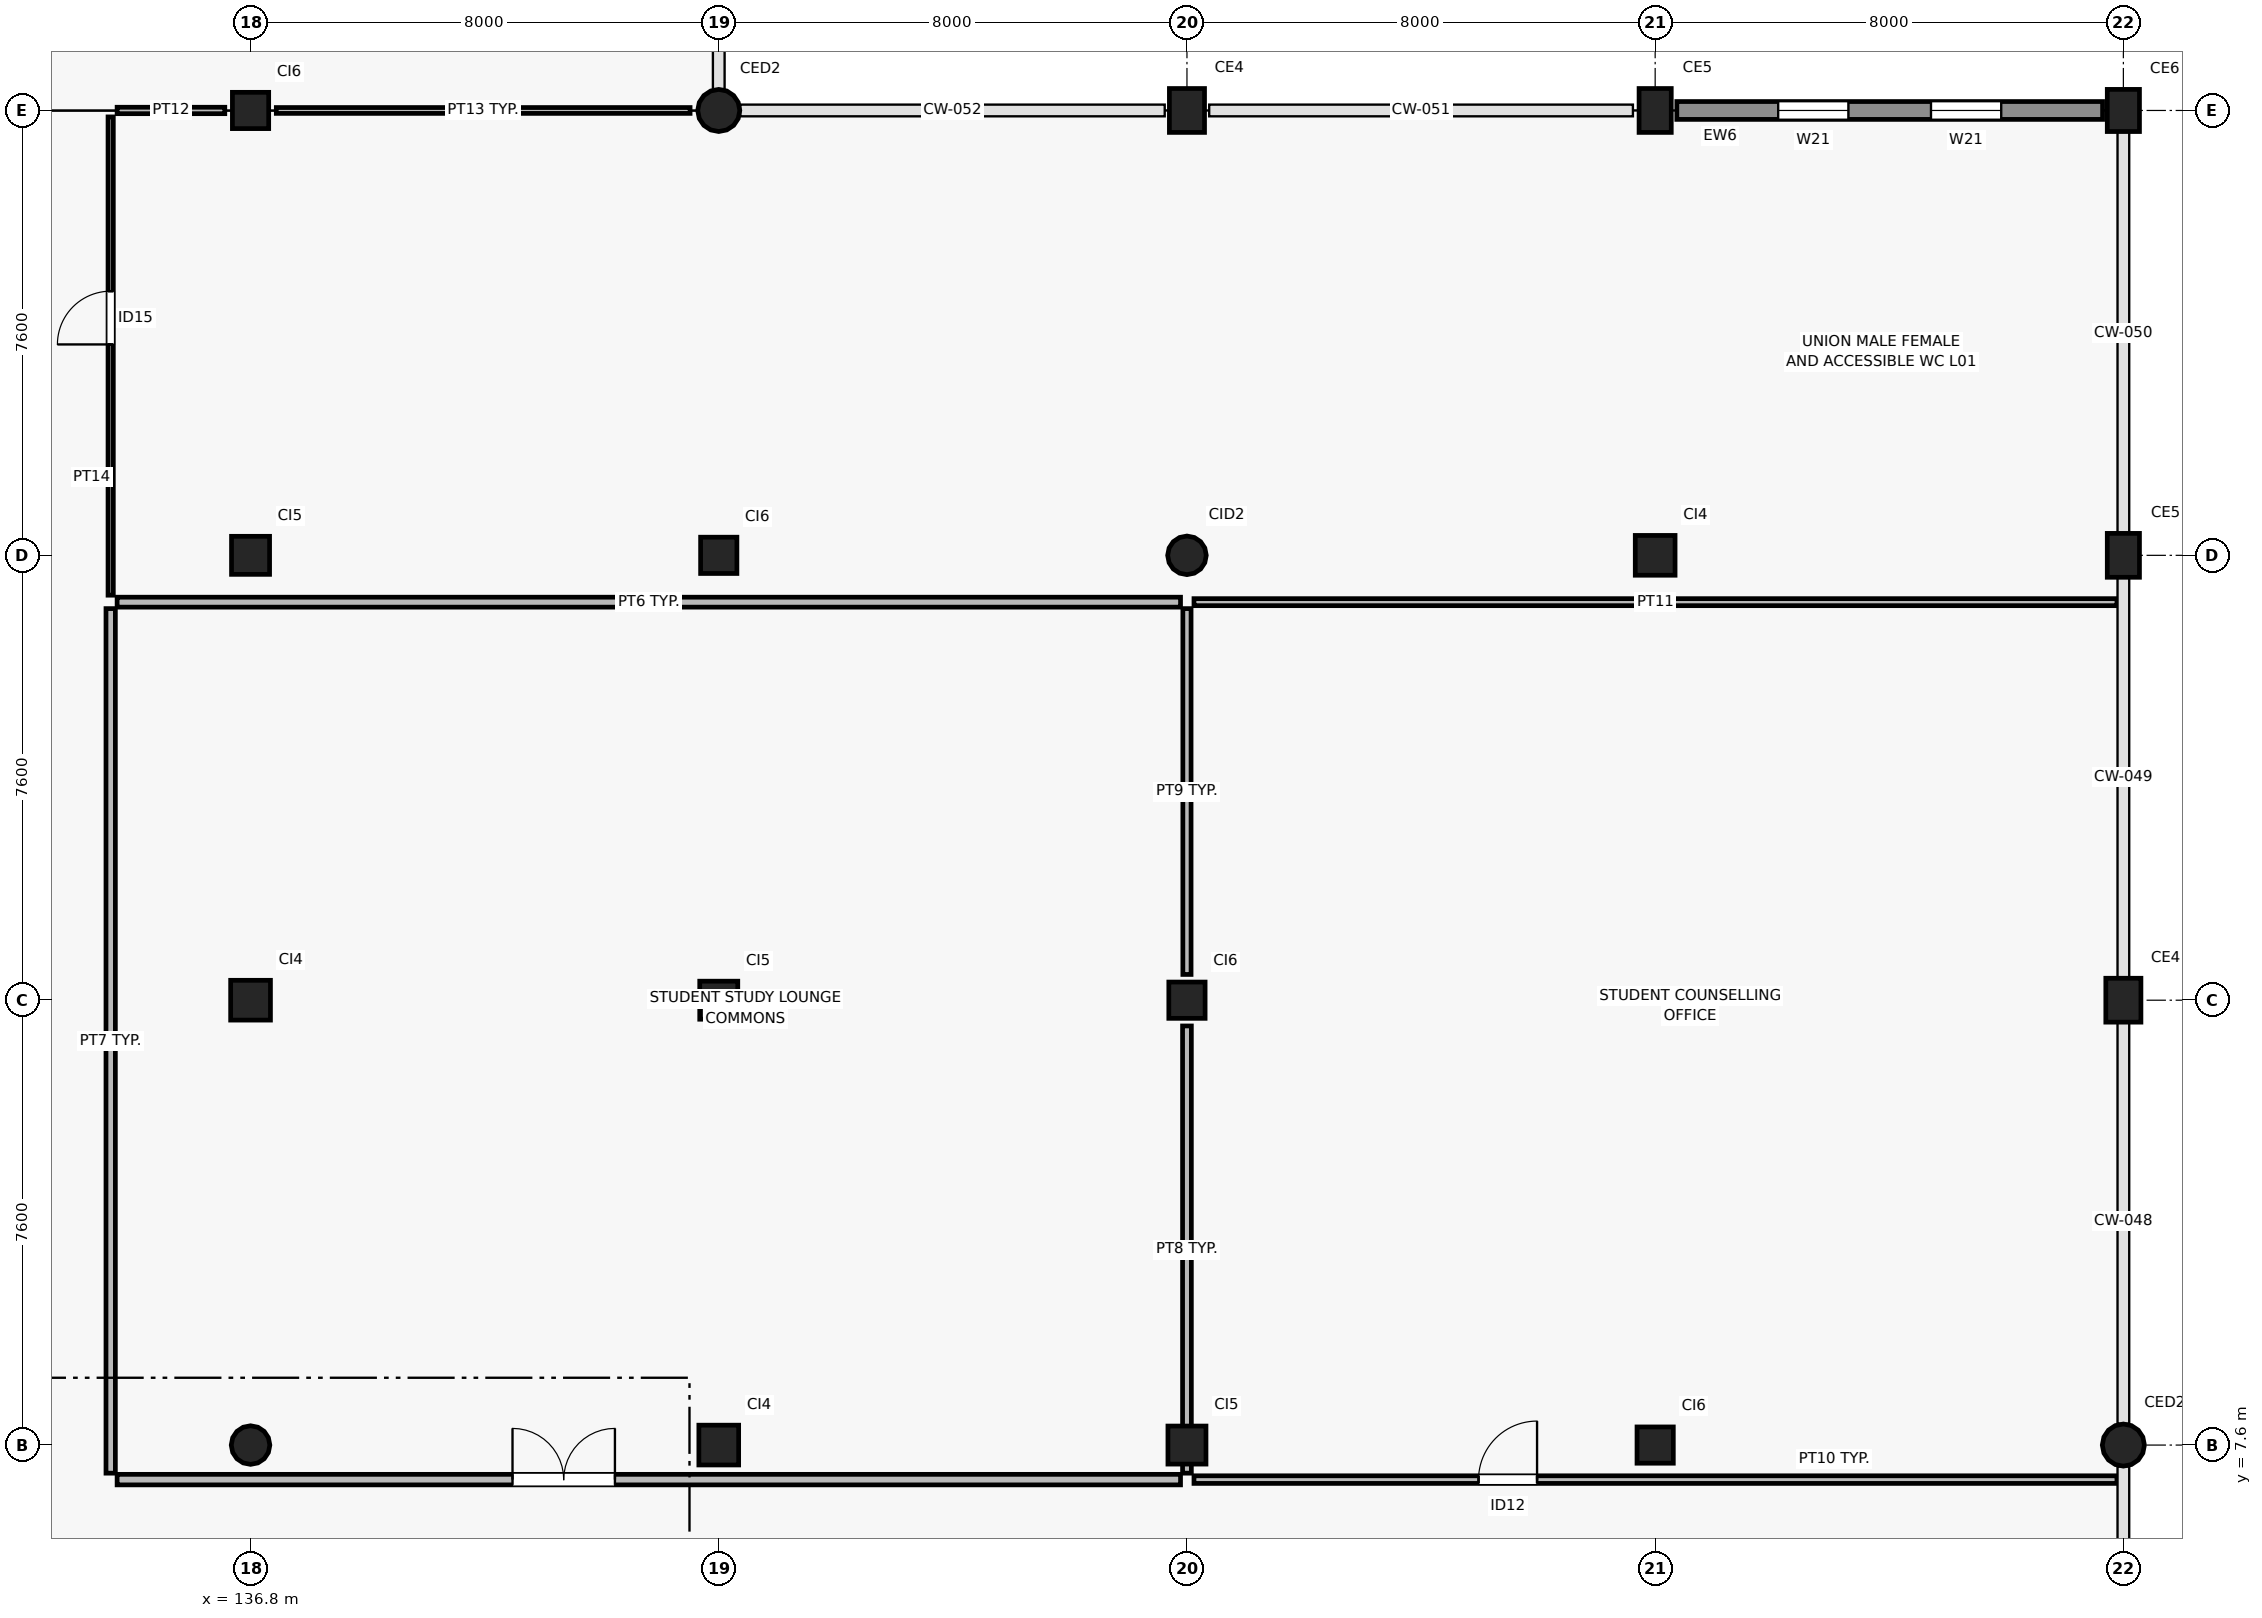
"""IFC4 building model, lengths in metres.
Left out: names, types, materials, properties, quantities, classifications, styles, units other than length and angle.
Written with IfcOpenShell. Run it as: python <this file> out.ifc"""

import sys

from ifc_helpers import new_model, si_unit, direction, frame, frame_2d, origin, origin_2d, place, context, subcontext, project, spatial, rectangle, circle, extrude, element, fill, save


model = new_model("IFC4")
c1 = context("Model", 3, precision=1e-05, world=origin(), true_north=direction((0.0, 1.0)))
c2 = subcontext(c1, "Body", "Model", "MODEL_VIEW")
j1 = project(units=[si_unit("LENGTHUNIT", "METRE"), si_unit("PLANEANGLEUNIT", "RADIAN")], contexts=[c1])
p1 = place(None, origin())
s1 = spatial("IfcSite", under=j1, at=p1, CompositionType="ELEMENT")
p2 = place(p1, origin())
s2 = spatial("IfcBuilding", under=s1, at=p2, CompositionType="ELEMENT")
p3 = place(p2, frame((0.0, 0.0, 4.5)))
s3 = spatial("IfcBuildingStorey", under=s2, at=p3, CompositionType="ELEMENT", Elevation=4.5)
p4 = place(p3, frame((136.8, 7.6, 0.0), z_axis=(0.0, 0.0, 1.0), x_axis=(1.0, 0.0, 0.0)))
e1 = element("IfcColumn", 1, at=p4, inside=s3, PredefinedType="COLUMN", context=c2, shape_type="SweptSolid", body=[
    extrude(circle(Radius=0.33, at=origin_2d()), origin(), (0.0, 0.0, 1.0), 4.5),
])
p5 = place(p3, frame((136.8, 15.2, 0.0), z_axis=(0.0, 0.0, 1.0), x_axis=(1.0, 0.0, 0.0)))
e2 = element("IfcColumn", 2, at=p5, inside=s3, PredefinedType="COLUMN", context=c2, shape_type="SweptSolid", body=[
    extrude(rectangle(XDim=0.68, YDim=0.68, at=origin_2d()), origin(), (0.0, 0.0, 1.0), 4.5),
])
p6 = place(p3, frame((136.8, 22.8, 0.0), z_axis=(0.0, 0.0, 1.0), x_axis=(1.0, 0.0, 0.0)))
e3 = element("IfcColumn", 3, at=p6, inside=s3, PredefinedType="COLUMN", context=c2, shape_type="SweptSolid", body=[
    extrude(rectangle(XDim=0.65, YDim=0.65, at=origin_2d()), origin(), (0.0, 0.0, 1.0), 4.5),
])
p7 = place(p3, frame((136.8, 30.4, 0.0), z_axis=(0.0, 0.0, 1.0), x_axis=(1.0, 0.0, 0.0)))
e4 = element("IfcColumn", 4, at=p7, inside=s3, PredefinedType="COLUMN", context=c2, shape_type="SweptSolid", body=[
    extrude(rectangle(XDim=0.62, YDim=0.62, at=origin_2d()), origin(), (0.0, 0.0, 1.0), 4.5),
])
p8 = place(p3, frame((144.8, 7.6, 0.0), z_axis=(0.0, 0.0, 1.0), x_axis=(1.0, 0.0, 0.0)))
e5 = element("IfcColumn", 5, at=p8, inside=s3, PredefinedType="COLUMN", context=c2, shape_type="SweptSolid", body=[
    extrude(rectangle(XDim=0.68, YDim=0.68, at=origin_2d()), origin(), (0.0, 0.0, 1.0), 4.5),
])
p9 = place(p3, frame((144.8, 15.2, 0.0), z_axis=(0.0, 0.0, 1.0), x_axis=(1.0, 0.0, 0.0)))
e6 = element("IfcColumn", 6, at=p9, inside=s3, PredefinedType="COLUMN", context=c2, shape_type="SweptSolid", body=[
    extrude(rectangle(XDim=0.65, YDim=0.65, at=origin_2d()), origin(), (0.0, 0.0, 1.0), 4.5),
])
p10 = place(p3, frame((144.8, 22.8, 0.0), z_axis=(0.0, 0.0, 1.0), x_axis=(1.0, 0.0, 0.0)))
e7 = element("IfcColumn", 7, at=p10, inside=s3, PredefinedType="COLUMN", context=c2, shape_type="SweptSolid", body=[
    extrude(rectangle(XDim=0.62, YDim=0.62, at=origin_2d()), origin(), (0.0, 0.0, 1.0), 4.5),
])
p11 = place(p3, frame((144.8, 30.4, 0.0), z_axis=(0.0, 0.0, 1.0), x_axis=(1.0, 0.0, 0.0)))
e8 = element("IfcColumn", 8, at=p11, inside=s3, PredefinedType="COLUMN", context=c2, shape_type="SweptSolid", body=[
    extrude(circle(Radius=0.36, at=origin_2d()), origin(), (0.0, 0.0, 1.0), 4.5),
])
p12 = place(p3, frame((152.8, 7.6, 0.0), z_axis=(0.0, 0.0, 1.0), x_axis=(1.0, 0.0, 0.0)))
e9 = element("IfcColumn", 9, at=p12, inside=s3, PredefinedType="COLUMN", context=c2, shape_type="SweptSolid", body=[
    extrude(rectangle(XDim=0.65, YDim=0.65, at=origin_2d()), origin(), (0.0, 0.0, 1.0), 4.5),
])
p13 = place(p3, frame((152.8, 15.2, 0.0), z_axis=(0.0, 0.0, 1.0), x_axis=(1.0, 0.0, 0.0)))
e10 = element("IfcColumn", 10, at=p13, inside=s3, PredefinedType="COLUMN", context=c2, shape_type="SweptSolid", body=[
    extrude(rectangle(XDim=0.62, YDim=0.62, at=origin_2d()), origin(), (0.0, 0.0, 1.0), 4.5),
])
p14 = place(p3, frame((152.8, 22.8, 0.0), z_axis=(0.0, 0.0, 1.0), x_axis=(1.0, 0.0, 0.0)))
e11 = element("IfcColumn", 11, at=p14, inside=s3, PredefinedType="COLUMN", context=c2, shape_type="SweptSolid", body=[
    extrude(circle(Radius=0.33, at=origin_2d()), origin(), (0.0, 0.0, 1.0), 4.5),
])
p15 = place(p3, frame((152.8, 30.4, 0.0), z_axis=(0.0, 0.0, 1.0), x_axis=(1.0, 0.0, 0.0)))
e12 = element("IfcColumn", 12, at=p15, inside=s3, PredefinedType="COLUMN", context=c2, shape_type="SweptSolid", body=[
    extrude(rectangle(XDim=0.75, YDim=0.6, at=origin_2d()), origin(), (0.0, 0.0, 1.0), 4.5),
])
p16 = place(p3, frame((160.8, 7.6, 0.0), z_axis=(0.0, 0.0, 1.0), x_axis=(1.0, 0.0, 0.0)))
e13 = element("IfcColumn", 13, at=p16, inside=s3, PredefinedType="COLUMN", context=c2, shape_type="SweptSolid", body=[
    extrude(rectangle(XDim=0.62, YDim=0.62, at=origin_2d()), origin(), (0.0, 0.0, 1.0), 4.5),
])
p17 = place(p3, frame((160.8, 22.8, 0.0), z_axis=(0.0, 0.0, 1.0), x_axis=(1.0, 0.0, 0.0)))
e14 = element("IfcColumn", 14, at=p17, inside=s3, PredefinedType="COLUMN", context=c2, shape_type="SweptSolid", body=[
    extrude(rectangle(XDim=0.68, YDim=0.68, at=origin_2d()), origin(), (0.0, 0.0, 1.0), 4.5),
])
p18 = place(p3, frame((160.8, 30.4, 0.0), z_axis=(0.0, 0.0, 1.0), x_axis=(1.0, 0.0, 0.0)))
e15 = element("IfcColumn", 15, at=p18, inside=s3, PredefinedType="COLUMN", context=c2, shape_type="SweptSolid", body=[
    extrude(rectangle(XDim=0.75, YDim=0.55, at=origin_2d()), origin(), (0.0, 0.0, 1.0), 4.5),
])
p19 = place(p3, frame((168.8, 7.6, 0.0), z_axis=(0.0, 0.0, 1.0), x_axis=(1.0, 0.0, 0.0)))
e16 = element("IfcColumn", 16, at=p19, inside=s3, PredefinedType="COLUMN", context=c2, shape_type="SweptSolid", body=[
    extrude(circle(Radius=0.36, at=origin_2d()), origin(), (0.0, 0.0, 1.0), 4.5),
])
p20 = place(p3, frame((168.8, 15.2, 0.0), z_axis=(0.0, 0.0, 1.0), x_axis=(1.0, 0.0, 0.0)))
e17 = element("IfcColumn", 17, at=p20, inside=s3, PredefinedType="COLUMN", context=c2, shape_type="SweptSolid", body=[
    extrude(rectangle(XDim=0.75, YDim=0.6, at=origin_2d()), origin(), (0.0, 0.0, 1.0), 4.5),
])
p21 = place(p3, frame((168.8, 22.8, 0.0), z_axis=(0.0, 0.0, 1.0), x_axis=(1.0, 0.0, 0.0)))
e18 = element("IfcColumn", 18, at=p21, inside=s3, PredefinedType="COLUMN", context=c2, shape_type="SweptSolid", body=[
    extrude(rectangle(XDim=0.75, YDim=0.55, at=origin_2d()), origin(), (0.0, 0.0, 1.0), 4.5),
])
p22 = place(p3, frame((168.8, 30.4, 0.0), z_axis=(0.0, 0.0, 1.0), x_axis=(1.0, 0.0, 0.0)))
e19 = element("IfcColumn", 19, at=p22, inside=s3, PredefinedType="COLUMN", context=c2, shape_type="SweptSolid", body=[
    extrude(rectangle(XDim=0.72, YDim=0.55, at=origin_2d()), origin(), (0.0, 0.0, 1.0), 4.5),
])
p23 = place(p3, frame((168.445, 30.4, 0.0), z_axis=(0.0, 0.0, 1.0), x_axis=(-1.0, 0.0, 0.0)))
e20 = element("IfcWall", 20, at=p23, inside=s3, PredefinedType="SOLIDWALL", context=c2, shape_type="SweptSolid", body=[
    extrude(rectangle(XDim=7.275, YDim=0.305, at=frame_2d((3.638, 0.0))), origin(), (0.0, 0.0, 1.0), 3.67),
])
p24 = place(p23, frame((1.732, 0.0, 0.9)))
e21 = element("IfcOpeningElement", 21, at=p24, cuts=e20, PredefinedType="OPENING", context=c2, shape_type="SweptSolid", body=[
    extrude(rectangle(XDim=1.2, YDim=1.25, at=frame_2d((0.6, 0.625))), frame((0.0, 0.162, 0.0), z_axis=(0.0, -1.0, 0.0), x_axis=(1.0, 0.0, 0.0)), (0.0, 0.0, 1.0), 0.325),
])
p25 = place(p23, frame((4.343, 0.0, 0.9)))
e22 = element("IfcOpeningElement", 22, at=p25, cuts=e20, PredefinedType="OPENING", context=c2, shape_type="SweptSolid", body=[
    extrude(rectangle(XDim=1.2, YDim=1.25, at=frame_2d((0.6, 0.625))), frame((0.0, 0.162, 0.0), z_axis=(0.0, -1.0, 0.0), x_axis=(1.0, 0.0, 0.0)), (0.0, 0.0, 1.0), 0.325),
])
p26 = place(p3, frame((134.52, 7.01, 0.0), z_axis=(0.0, 0.0, 1.0), x_axis=(1.0, 0.0, 0.0)))
e23 = element("IfcWall", 23, at=p26, inside=s3, PredefinedType="PARTITIONING", context=c2, shape_type="SweptSolid", body=[
    extrude(rectangle(XDim=18.17, YDim=0.18, at=frame_2d((9.085, 0.0))), origin(), (0.0, 0.0, 1.0), 4.2),
])
p27 = place(p26, frame((6.756, 0.0, 0.0)))
e24 = element("IfcOpeningElement", 24, at=p27, cuts=e23, PredefinedType="OPENING", context=c2, shape_type="SweptSolid", body=[
    extrude(rectangle(XDim=1.75, YDim=2.25, at=frame_2d((0.875, 1.125))), frame((0.0, 0.1, 0.0), z_axis=(0.0, -1.0, 0.0), x_axis=(1.0, 0.0, 0.0)), (0.0, 0.0, 1.0), 0.2),
])
p28 = place(p3, frame((134.52, 22.0, 0.0), z_axis=(0.0, 0.0, 1.0), x_axis=(1.0, 0.0, 0.0)))
e25 = element("IfcWall", 25, at=p28, inside=s3, PredefinedType="PARTITIONING", context=c2, shape_type="SweptSolid", body=[
    extrude(rectangle(XDim=18.17, YDim=0.17, at=frame_2d((9.085, 0.0))), origin(), (0.0, 0.0, 1.0), 4.2),
])
p29 = place(p3, frame((134.41, 7.12, 0.0), z_axis=(0.0, 0.0, 1.0), x_axis=(0.0, 1.0, 0.0)))
e26 = element("IfcWall", 26, at=p29, inside=s3, PredefinedType="PARTITIONING", context=c2, shape_type="SweptSolid", body=[
    extrude(rectangle(XDim=14.77, YDim=0.16, at=frame_2d((7.385, 0.0))), origin(), (0.0, 0.0, 1.0), 4.2),
])
p30 = place(p3, frame((152.8, 7.12, 0.0), z_axis=(0.0, 0.0, 1.0), x_axis=(0.0, 1.0, 0.0)))
e27 = element("IfcWall", 27, at=p30, inside=s3, PredefinedType="PARTITIONING", context=c2, shape_type="SweptSolid", body=[
    extrude(rectangle(XDim=7.64, YDim=0.15, at=frame_2d((3.82, 0.0))), origin(), (0.0, 0.0, 1.0), 3.64),
])
p31 = place(p3, frame((152.8, 15.64, 0.0), z_axis=(0.0, 0.0, 1.0), x_axis=(0.0, 1.0, 0.0)))
e28 = element("IfcWall", 28, at=p31, inside=s3, PredefinedType="PARTITIONING", context=c2, shape_type="SweptSolid", body=[
    extrude(rectangle(XDim=6.25, YDim=0.14, at=frame_2d((3.125, 0.0))), origin(), (0.0, 0.0, 1.0), 3.7),
])
p32 = place(p3, frame((152.92, 7.01, 0.0), z_axis=(0.0, 0.0, 1.0), x_axis=(1.0, 0.0, 0.0)))
e29 = element("IfcWall", 29, at=p32, inside=s3, PredefinedType="PARTITIONING", context=c2, shape_type="SweptSolid", body=[
    extrude(rectangle(XDim=15.77, YDim=0.13, at=frame_2d((7.885, 0.0))), origin(), (0.0, 0.0, 1.0), 4.2),
])
p33 = place(p32, frame((4.862, 0.0, 0.0)))
e30 = element("IfcOpeningElement", 30, at=p33, cuts=e29, PredefinedType="OPENING", context=c2, shape_type="SweptSolid", body=[
    extrude(rectangle(XDim=1.0, YDim=2.15, at=frame_2d((0.5, 1.075))), frame((0.0, 0.075, 0.0), z_axis=(0.0, -1.0, 0.0), x_axis=(1.0, 0.0, 0.0)), (0.0, 0.0, 1.0), 0.15),
])
p34 = place(p3, frame((152.92, 22.0, 0.0), z_axis=(0.0, 0.0, 1.0), x_axis=(1.0, 0.0, 0.0)))
e31 = element("IfcWall", 31, at=p34, inside=s3, PredefinedType="PARTITIONING", context=c2, shape_type="SweptSolid", body=[
    extrude(rectangle(XDim=15.77, YDim=0.12, at=frame_2d((7.885, 0.0))), origin(), (0.0, 0.0, 1.0), 4.2),
])
p35 = place(p3, frame((134.52, 30.4, 0.0), z_axis=(0.0, 0.0, 1.0), x_axis=(1.0, 0.0, 0.0)))
e32 = element("IfcWall", 32, at=p35, inside=s3, PredefinedType="PARTITIONING", context=c2, shape_type="SweptSolid", body=[
    extrude(rectangle(XDim=1.84, YDim=0.11, at=frame_2d((0.92, 0.0))), origin(), (0.0, 0.0, 1.0), 4.2),
])
p36 = place(p3, frame((137.24, 30.4, 0.0), z_axis=(0.0, 0.0, 1.0), x_axis=(1.0, 0.0, 0.0)))
e33 = element("IfcWall", 33, at=p36, inside=s3, PredefinedType="PARTITIONING", context=c2, shape_type="SweptSolid", body=[
    extrude(rectangle(XDim=7.07, YDim=0.1, at=frame_2d((3.535, 0.0))), origin(), (0.0, 0.0, 1.0), 3.56),
])
p37 = place(p3, frame((134.41, 22.119, 0.0), z_axis=(0.0, 0.0, 1.0), x_axis=(0.0, 1.0, 0.0)))
e34 = element("IfcWall", 34, at=p37, inside=s3, PredefinedType="PARTITIONING", context=c2, shape_type="SweptSolid", body=[
    extrude(rectangle(XDim=8.171, YDim=0.09, at=frame_2d((4.085, 0.0))), origin(), (0.0, 0.0, 1.0), 4.2),
])
p38 = place(p37, frame((4.284, 0.0, 0.0)))
e35 = element("IfcOpeningElement", 35, at=p38, cuts=e34, PredefinedType="OPENING", context=c2, shape_type="SweptSolid", body=[
    extrude(rectangle(XDim=0.91, YDim=2.1, at=frame_2d((0.455, 1.05))), frame((0.0, 0.055, 0.0), z_axis=(0.0, -1.0, 0.0), x_axis=(1.0, 0.0, 0.0)), (0.0, 0.0, 1.0), 0.11),
])
p39 = place(p24, origin())
e36 = element("IfcWindow", 36, at=p39, inside=s3, PartitioningType="SINGLE_PANEL", PredefinedType="WINDOW", context=c2, shape_type="SweptSolid", body=[
    extrude(rectangle(XDim=1.2, YDim=1.25, at=frame_2d((0.6, 0.625))), frame((0.0, 0.03, 0.0), z_axis=(0.0, -1.0, 0.0), x_axis=(1.0, 0.0, 0.0)), (0.0, 0.0, 1.0), 0.06),
])
fill(e21, e36)
p40 = place(p25, origin())
e37 = element("IfcWindow", 37, at=p40, inside=s3, PartitioningType="SINGLE_PANEL", PredefinedType="WINDOW", context=c2, shape_type="SweptSolid", body=[
    extrude(rectangle(XDim=1.2, YDim=1.25, at=frame_2d((0.6, 0.625))), frame((0.0, 0.03, 0.0), z_axis=(0.0, -1.0, 0.0), x_axis=(1.0, 0.0, 0.0)), (0.0, 0.0, 1.0), 0.06),
])
fill(e22, e37)
p41 = place(p27, origin())
e38 = element("IfcDoor", 38, at=p41, inside=s3, OperationType="DOUBLE_DOOR_SINGLE_SWING", PredefinedType="DOOR", context=c2, shape_type="SweptSolid", body=[
    extrude(rectangle(XDim=1.75, YDim=2.25, at=frame_2d((0.875, 1.125))), frame((0.0, 0.025, 0.0), z_axis=(0.0, -1.0, 0.0), x_axis=(1.0, 0.0, 0.0)), (0.0, 0.0, 1.0), 0.05),
])
fill(e24, e38)
p42 = place(p33, origin())
e39 = element("IfcDoor", 39, at=p42, inside=s3, OperationType="SINGLE_SWING_RIGHT", PredefinedType="DOOR", context=c2, shape_type="SweptSolid", body=[
    extrude(rectangle(XDim=1.0, YDim=2.15, at=frame_2d((0.5, 1.075))), frame((0.0, 0.025, 0.0), z_axis=(0.0, -1.0, 0.0), x_axis=(1.0, 0.0, 0.0)), (0.0, 0.0, 1.0), 0.05),
])
fill(e30, e39)
p43 = place(p38, origin())
e40 = element("IfcDoor", 40, at=p43, inside=s3, OperationType="SINGLE_SWING_LEFT", PredefinedType="DOOR", context=c2, shape_type="SweptSolid", body=[
    extrude(rectangle(XDim=0.91, YDim=2.1, at=frame_2d((0.455, 1.05))), frame((0.0, 0.025, 0.0), z_axis=(0.0, -1.0, 0.0), x_axis=(1.0, 0.0, 0.0)), (0.0, 0.0, 1.0), 0.05),
])
fill(e35, e40)
save(model, sys.argv[1])
